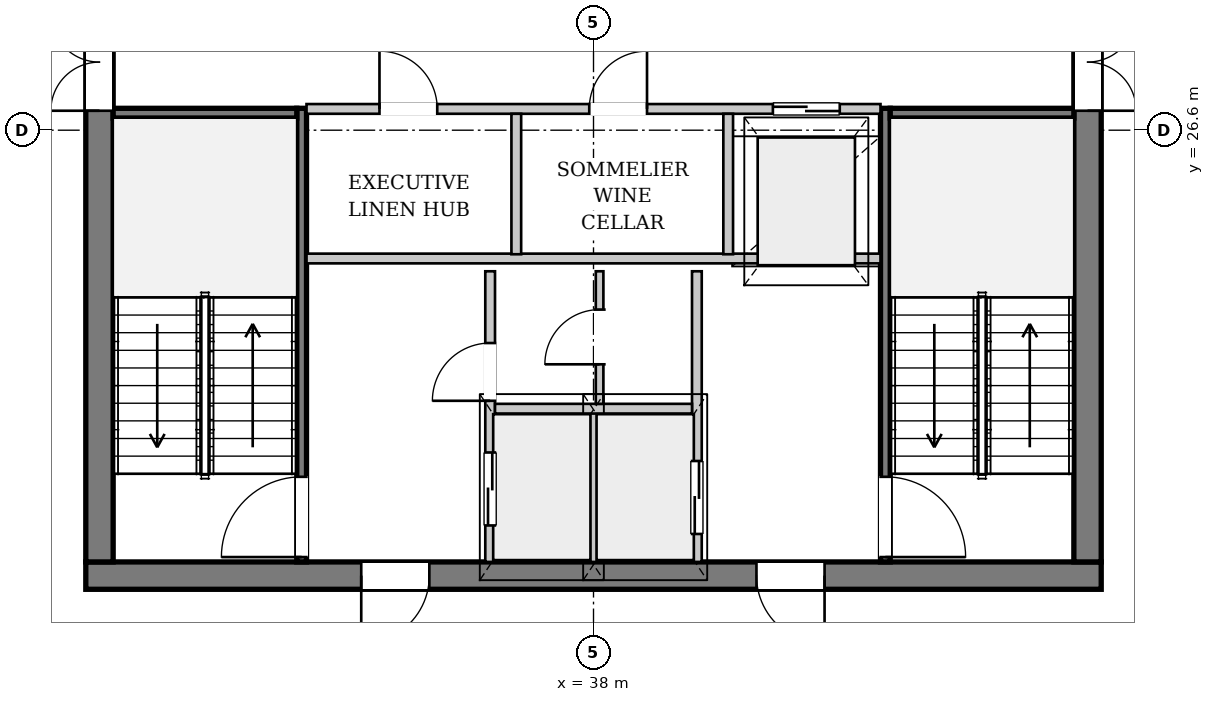
"""IFC4 building model, lengths in metres.
Left out: names, types, materials, properties, quantities, classifications, styles, units other than length and angle.
Written with IfcOpenShell. Run it as: python <this file> out.ifc"""

import sys

from ifc_helpers import new_model, si_unit, direction, frame, frame_2d, origin, place, context, subcontext, project, spatial, rectangle, extrude, source, transform, mapped, element, fill, save


model = new_model("IFC4")
c1 = context("Model", 3, precision=1e-05, world=origin(), true_north=direction((0.0, 1.0)))
c2 = subcontext(c1, "Body", "Model", "MODEL_VIEW")
j1 = project(units=[si_unit("LENGTHUNIT", "METRE"), si_unit("PLANEANGLEUNIT", "RADIAN")], contexts=[c1])
p1 = place(None, origin())
s1 = spatial("IfcSite", under=j1, at=p1, CompositionType="ELEMENT")
p2 = place(p1, origin())
s2 = spatial("IfcBuilding", under=s1, at=p2, CompositionType="ELEMENT")
p3 = place(p2, frame((0.0, 0.0, 259.7)))
s3 = spatial("IfcBuildingStorey", under=s2, at=p3, CompositionType="ELEMENT", Elevation=259.7)
p4 = place(p3, frame((51.72, 26.618, 0.0), z_axis=(0.0, 0.0, 1.0), x_axis=(-0.270053350252, -0.962845360386, 0.0)))
e1 = element("IfcWall", 1, at=p4, inside=s3, PredefinedType="SOLIDWALL", context=c2, shape_type="SweptSolid", body=[
    extrude(rectangle(XDim=22.391, YDim=0.32, at=frame_2d((11.195, 0.0))), origin(), (0.0, 0.0, 1.0), 2.872),
])
p5 = place(p4, frame((6.415, 0.0, 0.0)))
e2 = element("IfcOpeningElement", 2, at=p5, cuts=e1, PredefinedType="OPENING", context=c2, shape_type="SweptSolid", body=[
    extrude(rectangle(XDim=1.5, YDim=2.3, at=frame_2d((0.75, 1.15))), frame((0.0, 0.17, 0.0), z_axis=(0.0, -1.0, 0.0), x_axis=(1.0, 0.0, 0.0)), (0.0, 0.0, 1.0), 0.34),
])
p6 = place(p4, frame((15.269, 0.0, 0.402)))
e3 = element("IfcOpeningElement", 3, at=p6, cuts=e1, PredefinedType="OPENING", context=c2, shape_type="SweptSolid", body=[
    extrude(rectangle(XDim=2.6, YDim=2.35, at=frame_2d((1.3, 1.175))), frame((0.0, 0.17, 0.0), z_axis=(0.0, -1.0, 0.0), x_axis=(1.0, 0.0, 0.0)), (0.0, 0.0, 1.0), 0.34),
])
p7 = place(p3, frame((15.819, 27.087, 0.0), z_axis=(0.0, 0.0, 1.0), x_axis=(0.810286001924, 0.586034636421, 0.0)))
e4 = element("IfcWall", 4, at=p7, inside=s3, PredefinedType="SOLIDWALL", context=c2, shape_type="SweptSolid", body=[
    extrude(rectangle(XDim=21.866, YDim=0.38, at=frame_2d((10.933, 0.0))), origin(), (0.0, 0.0, 1.0), 2.872),
])
p8 = place(p7, frame((5.023, 0.0, 0.502)))
e5 = element("IfcOpeningElement", 5, at=p8, cuts=e4, PredefinedType="OPENING", context=c2, shape_type="SweptSolid", body=[
    extrude(rectangle(XDim=2.2, YDim=2.25, at=frame_2d((1.1, 1.125))), frame((0.0, 0.2, 0.0), z_axis=(0.0, -1.0, 0.0), x_axis=(1.0, 0.0, 0.0)), (0.0, 0.0, 1.0), 0.4),
])
p9 = place(p7, frame((16.244, 0.0, 0.502)))
e6 = element("IfcOpeningElement", 6, at=p9, cuts=e4, PredefinedType="OPENING", context=c2, shape_type="SweptSolid", body=[
    extrude(rectangle(XDim=2.2, YDim=2.25, at=frame_2d((1.1, 1.125))), frame((0.0, 0.2, 0.0), z_axis=(0.0, -1.0, 0.0), x_axis=(1.0, 0.0, 0.0)), (0.0, 0.0, 1.0), 0.4),
])
p10 = place(p3, frame((46.35, 19.275, 0.0), z_axis=(0.0, 0.0, 1.0), x_axis=(-1.0, 0.0, 0.0)))
e7 = element("IfcWall", 7, at=p10, inside=s3, PredefinedType="SHEAR", context=c2, shape_type="SweptSolid", body=[
    extrude(rectangle(XDim=16.7, YDim=0.45, at=frame_2d((8.35, 0.0))), origin(), (0.0, 0.0, 1.0), 3.38),
])
p11 = place(p10, frame((4.55, 0.0, 0.0)))
e8 = element("IfcOpeningElement", 8, at=p11, cuts=e7, PredefinedType="OPENING", context=c2, shape_type="SweptSolid", body=[
    extrude(rectangle(XDim=1.12, YDim=2.25, at=frame_2d((0.56, 1.125))), frame((0.0, 0.235, 0.0), z_axis=(0.0, -1.0, 0.0), x_axis=(1.0, 0.0, 0.0)), (0.0, 0.0, 1.0), 0.47),
])
p12 = place(p10, frame((11.05, 0.0, 0.0)))
e9 = element("IfcOpeningElement", 9, at=p12, cuts=e7, PredefinedType="OPENING", context=c2, shape_type="SweptSolid", body=[
    extrude(rectangle(XDim=1.12, YDim=2.25, at=frame_2d((0.56, 1.125))), frame((0.0, 0.235, 0.0), z_axis=(0.0, -1.0, 0.0), x_axis=(1.0, 0.0, 0.0)), (0.0, 0.0, 1.0), 0.47),
])
p13 = place(p3, frame((29.875, 19.5, 0.0), z_axis=(0.0, 0.0, 1.0), x_axis=(0.0, 1.0, 0.0)))
e10 = element("IfcWall", 10, at=p13, inside=s3, PredefinedType="SHEAR", context=c2, shape_type="SweptSolid", body=[
    extrude(rectangle(XDim=14.2, YDim=0.45, at=frame_2d((7.1, 0.0))), origin(), (0.0, 0.0, 1.0), 3.38),
])
p14 = place(p13, frame((7.42, 0.0, 0.0)))
e11 = element("IfcOpeningElement", 11, at=p14, cuts=e10, PredefinedType="OPENING", context=c2, shape_type="SweptSolid", body=[
    extrude(rectangle(XDim=1.6, YDim=2.2, at=frame_2d((0.8, 1.1))), frame((0.0, 0.235, 0.0), z_axis=(0.0, -1.0, 0.0), x_axis=(1.0, 0.0, 0.0)), (0.0, 0.0, 1.0), 0.47),
])
p15 = place(p3, frame((46.125, 33.7, 0.0), z_axis=(0.0, 0.0, 1.0), x_axis=(0.0, -1.0, 0.0)))
e12 = element("IfcWall", 12, at=p15, inside=s3, PredefinedType="SHEAR", context=c2, shape_type="SweptSolid", body=[
    extrude(rectangle(XDim=14.2, YDim=0.45, at=frame_2d((7.1, 0.0))), origin(), (0.0, 0.0, 1.0), 3.38),
])
p16 = place(p15, frame((5.18, 0.0, 0.0)))
e13 = element("IfcOpeningElement", 13, at=p16, cuts=e12, PredefinedType="OPENING", context=c2, shape_type="SweptSolid", body=[
    extrude(rectangle(XDim=1.6, YDim=2.2, at=frame_2d((0.8, 1.1))), frame((0.0, 0.235, 0.0), z_axis=(0.0, -1.0, 0.0), x_axis=(1.0, 0.0, 0.0)), (0.0, 0.0, 1.0), 0.47),
])
p17 = place(p15, frame((2.05, 0.0, 0.0)))
e14 = element("IfcOpeningElement", 14, at=p17, cuts=e12, PredefinedType="OPENING", context=c2, shape_type="SweptSolid", body=[
    extrude(rectangle(XDim=0.95, YDim=2.1, at=frame_2d((0.475, 1.05))), frame((0.0, 0.235, 0.0), z_axis=(0.0, -1.0, 0.0), x_axis=(1.0, 0.0, 0.0)), (0.0, 0.0, 1.0), 0.47),
])
p18 = place(p3, frame((33.2, 19.5, 0.0), z_axis=(0.0, 0.0, 1.0), x_axis=(0.0, 1.0, 0.0)))
e15 = element("IfcWall", 15, at=p18, inside=s3, PredefinedType="PARTITIONING", context=c2, shape_type="SweptSolid", body=[
    extrude(rectangle(XDim=7.46, YDim=0.16, at=frame_2d((3.73, 0.0))), origin(), (0.0, 0.0, 1.0), 3.38),
])
p19 = place(p18, frame((0.08, 0.0, 0.0)))
e16 = element("IfcOpeningElement", 16, at=p19, cuts=e15, PredefinedType="OPENING", context=c2, shape_type="SweptSolid", body=[
    extrude(rectangle(XDim=1.32, YDim=2.2, at=frame_2d((0.66, 1.1))), frame((0.0, 0.09, 0.0), z_axis=(0.0, -1.0, 0.0), x_axis=(1.0, 0.0, 0.0)), (0.0, 0.0, 1.0), 0.18),
])
p20 = place(p3, frame((30.1, 26.88, 0.0), z_axis=(0.0, 0.0, 1.0), x_axis=(1.0, 0.0, 0.0)))
e17 = element("IfcWall", 17, at=p20, inside=s3, PredefinedType="PARTITIONING", context=c2, shape_type="SweptSolid", body=[
    extrude(rectangle(XDim=3.02, YDim=0.16, at=frame_2d((1.51, 0.0))), origin(), (0.0, 0.0, 1.0), 3.38),
])
p21 = place(p3, frame((42.8, 26.96, 0.0), z_axis=(0.0, 0.0, 1.0), x_axis=(0.0, -1.0, 0.0)))
e18 = element("IfcWall", 18, at=p21, inside=s3, PredefinedType="PARTITIONING", context=c2, shape_type="SweptSolid", body=[
    extrude(rectangle(XDim=7.46, YDim=0.16, at=frame_2d((3.73, 0.0))), origin(), (0.0, 0.0, 1.0), 3.38),
])
p22 = place(p21, frame((6.06, 0.0, 0.0)))
e19 = element("IfcOpeningElement", 19, at=p22, cuts=e18, PredefinedType="OPENING", context=c2, shape_type="SweptSolid", body=[
    extrude(rectangle(XDim=1.32, YDim=2.2, at=frame_2d((0.66, 1.1))), frame((0.0, 0.09, 0.0), z_axis=(0.0, -1.0, 0.0), x_axis=(1.0, 0.0, 0.0)), (0.0, 0.0, 1.0), 0.18),
])
p23 = place(p3, frame((42.88, 26.88, 0.0), z_axis=(0.0, 0.0, 1.0), x_axis=(1.0, 0.0, 0.0)))
e20 = element("IfcWall", 20, at=p23, inside=s3, PredefinedType="PARTITIONING", context=c2, shape_type="SweptSolid", body=[
    extrude(rectangle(XDim=3.02, YDim=0.16, at=frame_2d((1.51, 0.0))), origin(), (0.0, 0.0, 1.0), 3.38),
])
p24 = place(p3, frame((36.3, 19.5, 0.0), z_axis=(0.0, 0.0, 1.0), x_axis=(0.0, 1.0, 0.0)))
e21 = element("IfcWall", 21, at=p24, inside=s3, PredefinedType="PARTITIONING", context=c2, shape_type="SweptSolid", body=[
    extrude(rectangle(XDim=4.78, YDim=0.16, at=frame_2d((2.39, 0.0))), origin(), (0.0, 0.0, 1.0), 3.38),
])
p25 = place(p24, frame((0.6, 0.0, 0.0)))
e22 = element("IfcOpeningElement", 22, at=p25, cuts=e21, PredefinedType="OPENING", context=c2, shape_type="SweptSolid", body=[
    extrude(rectangle(XDim=1.2, YDim=2.2, at=frame_2d((0.6, 1.1))), frame((0.0, 0.09, 0.0), z_axis=(0.0, -1.0, 0.0), x_axis=(1.0, 0.0, 0.0)), (0.0, 0.0, 1.0), 0.18),
])
p26 = place(p24, frame((2.65, 0.0, 0.0)))
e23 = element("IfcOpeningElement", 23, at=p26, cuts=e21, PredefinedType="OPENING", context=c2, shape_type="SweptSolid", body=[
    extrude(rectangle(XDim=0.95, YDim=2.1, at=frame_2d((0.475, 1.05))), frame((0.0, 0.09, 0.0), z_axis=(0.0, -1.0, 0.0), x_axis=(1.0, 0.0, 0.0)), (0.0, 0.0, 1.0), 0.18),
])
p27 = place(p3, frame((39.7, 24.28, 0.0), z_axis=(0.0, 0.0, 1.0), x_axis=(0.0, -1.0, 0.0)))
e24 = element("IfcWall", 24, at=p27, inside=s3, PredefinedType="PARTITIONING", context=c2, shape_type="SweptSolid", body=[
    extrude(rectangle(XDim=4.78, YDim=0.16, at=frame_2d((2.39, 0.0))), origin(), (0.0, 0.0, 1.0), 3.38),
])
p28 = place(p27, frame((3.12, 0.0, 0.0)))
e25 = element("IfcOpeningElement", 25, at=p28, cuts=e24, PredefinedType="OPENING", context=c2, shape_type="SweptSolid", body=[
    extrude(rectangle(XDim=1.2, YDim=2.2, at=frame_2d((0.6, 1.1))), frame((0.0, 0.09, 0.0), z_axis=(0.0, -1.0, 0.0), x_axis=(1.0, 0.0, 0.0)), (0.0, 0.0, 1.0), 0.18),
])
p29 = place(p3, frame((38.0, 19.5, 0.0), z_axis=(0.0, 0.0, 1.0), x_axis=(0.0, 1.0, 0.0)))
e26 = element("IfcWall", 26, at=p29, inside=s3, PredefinedType="PARTITIONING", context=c2, shape_type="SweptSolid", body=[
    extrude(rectangle(XDim=2.46, YDim=0.125, at=frame_2d((1.23, 0.0))), origin(), (0.0, 0.0, 1.0), 3.38),
])
p30 = place(p3, frame((36.38, 22.02, 0.0), z_axis=(0.0, 0.0, 1.0), x_axis=(1.0, 0.0, 0.0)))
e27 = element("IfcWall", 27, at=p30, inside=s3, PredefinedType="PARTITIONING", context=c2, shape_type="SweptSolid", body=[
    extrude(rectangle(XDim=3.24, YDim=0.16, at=frame_2d((1.62, 0.0))), origin(), (0.0, 0.0, 1.0), 3.38),
])
p31 = place(p3, frame((33.28, 24.49, 0.0), z_axis=(0.0, 0.0, 1.0), x_axis=(1.0, 0.0, 0.0)))
e28 = element("IfcWall", 28, at=p31, inside=s3, PredefinedType="PARTITIONING", context=c2, shape_type="SweptSolid", body=[
    extrude(rectangle(XDim=9.44, YDim=0.16, at=frame_2d((4.72, 0.0))), origin(), (0.0, 0.0, 1.0), 3.38),
])
p32 = place(p3, frame((38.1, 22.1, 0.0), z_axis=(0.0, 0.0, 1.0), x_axis=(0.0, 1.0, 0.0)))
e29 = element("IfcWall", 29, at=p32, inside=s3, PredefinedType="PARTITIONING", context=c2, shape_type="SweptSolid", body=[
    extrude(rectangle(XDim=2.18, YDim=0.125, at=frame_2d((1.09, 0.0))), origin(), (0.0, 0.0, 1.0), 3.38),
])
p33 = place(p32, frame((0.65, 0.0, 0.0)))
e30 = element("IfcOpeningElement", 30, at=p33, cuts=e29, PredefinedType="OPENING", context=c2, shape_type="SweptSolid", body=[
    extrude(rectangle(XDim=0.9, YDim=2.1, at=frame_2d((0.45, 1.05))), frame((0.0, 0.073, 0.0), z_axis=(0.0, -1.0, 0.0), x_axis=(1.0, 0.0, 0.0)), (0.0, 0.0, 1.0), 0.145),
])
p34 = place(p3, frame((33.28, 26.95, 0.0), z_axis=(0.0, 0.0, 1.0), x_axis=(1.0, 0.0, 0.0)))
e31 = element("IfcWall", 31, at=p34, inside=s3, PredefinedType="PARTITIONING", context=c2, shape_type="SweptSolid", body=[
    extrude(rectangle(XDim=9.44, YDim=0.16, at=frame_2d((4.72, 0.0))), origin(), (0.0, 0.0, 1.0), 3.38),
])
p35 = place(p34, frame((1.2, 0.0, 0.0)))
e32 = element("IfcOpeningElement", 32, at=p35, cuts=e31, PredefinedType="OPENING", context=c2, shape_type="SweptSolid", body=[
    extrude(rectangle(XDim=0.95, YDim=2.1, at=frame_2d((0.475, 1.05))), frame((0.0, 0.09, 0.0), z_axis=(0.0, -1.0, 0.0), x_axis=(1.0, 0.0, 0.0)), (0.0, 0.0, 1.0), 0.18),
])
p36 = place(p34, frame((4.65, 0.0, 0.0)))
e33 = element("IfcOpeningElement", 33, at=p36, cuts=e31, PredefinedType="OPENING", context=c2, shape_type="SweptSolid", body=[
    extrude(rectangle(XDim=0.95, YDim=2.1, at=frame_2d((0.475, 1.05))), frame((0.0, 0.09, 0.0), z_axis=(0.0, -1.0, 0.0), x_axis=(1.0, 0.0, 0.0)), (0.0, 0.0, 1.0), 0.18),
])
p37 = place(p34, frame((7.67, 0.0, 0.0)))
e34 = element("IfcOpeningElement", 34, at=p37, cuts=e31, PredefinedType="OPENING", context=c2, shape_type="SweptSolid", body=[
    extrude(rectangle(XDim=1.1, YDim=2.2, at=frame_2d((0.55, 1.1))), frame((0.0, 0.09, 0.0), z_axis=(0.0, -1.0, 0.0), x_axis=(1.0, 0.0, 0.0)), (0.0, 0.0, 1.0), 0.18),
])
for number, where, z_axis, x_axis in (
    (35, (36.73, 24.56, 0.0), (0.0, 0.0, 1.0), (0.0, 1.0, 0.0)),
    (36, (40.215, 24.56, 0.0), (0.0, 0.0, 1.0), (0.0, 1.0, 0.0)),
):
    element("IfcWall", number, at=place(p3, frame(where, z_axis=z_axis, x_axis=x_axis)), inside=s3, PredefinedType="PARTITIONING", context=c2, shape_type="SweptSolid", body=[
        extrude(rectangle(XDim=2.31, YDim=0.16, at=frame_2d((1.155, 0.0))), origin(), (0.0, 0.0, 1.0), 3.38),
    ])
m1 = source(origin(), c2, "Body", "SweptSolid", [
    extrude(rectangle(XDim=1.12, YDim=2.25, at=frame_2d((0.56, 1.125))), frame((0.0, 0.025, 0.0), z_axis=(0.0, -1.0, 0.0), x_axis=(1.0, 0.0, 0.0)), (0.0, 0.0, 1.0), 0.05),
])
p38 = place(p11, origin())
e37 = element("IfcDoor", 37, at=p38, inside=s3, OperationType="SINGLE_SWING_LEFT", PredefinedType="DOOR", context=c2, shape_type="MappedRepresentation", body=[
    mapped(m1, transform((0.0, 0.0, 0.0), x_axis=(1.0, 0.0, 0.0), y_axis=(0.0, 1.0, 0.0), z_axis=(0.0, 0.0, 1.0), scale=1.0)),
])
fill(e8, e37)
p39 = place(p12, origin())
e38 = element("IfcDoor", 38, at=p39, inside=s3, OperationType="SINGLE_SWING_RIGHT", PredefinedType="DOOR", context=c2, shape_type="MappedRepresentation", body=[
    mapped(m1, transform((0.0, 0.0, 0.0), x_axis=(1.0, 0.0, 0.0), y_axis=(0.0, 1.0, 0.0), z_axis=(0.0, 0.0, 1.0), scale=1.0)),
])
fill(e9, e38)
m2 = source(origin(), c2, "Body", "SweptSolid", [
    extrude(rectangle(XDim=1.6, YDim=2.2, at=frame_2d((0.8, 1.1))), frame((0.0, 0.025, 0.0), z_axis=(0.0, -1.0, 0.0), x_axis=(1.0, 0.0, 0.0)), (0.0, 0.0, 1.0), 0.05),
])
p40 = place(p14, origin())
e39 = element("IfcDoor", 39, at=p40, inside=s3, OperationType="DOUBLE_DOOR_SINGLE_SWING", PredefinedType="DOOR", context=c2, shape_type="MappedRepresentation", body=[
    mapped(m2, transform((0.0, 0.0, 0.0), x_axis=(1.0, 0.0, 0.0), y_axis=(0.0, 1.0, 0.0), z_axis=(0.0, 0.0, 1.0), scale=1.0)),
])
fill(e11, e39)
p41 = place(p16, origin())
e40 = element("IfcDoor", 40, at=p41, inside=s3, OperationType="DOUBLE_DOOR_SINGLE_SWING", PredefinedType="DOOR", context=c2, shape_type="MappedRepresentation", body=[
    mapped(m2, transform((0.0, 0.0, 0.0), x_axis=(1.0, 0.0, 0.0), y_axis=(0.0, 1.0, 0.0), z_axis=(0.0, 0.0, 1.0), scale=1.0)),
])
fill(e13, e40)
m3 = source(origin(), c2, "Body", "SweptSolid", [
    extrude(rectangle(XDim=1.32, YDim=2.2, at=frame_2d((0.66, 1.1))), frame((0.0, 0.025, 0.0), z_axis=(0.0, -1.0, 0.0), x_axis=(1.0, 0.0, 0.0)), (0.0, 0.0, 1.0), 0.05),
])
p42 = place(p19, origin())
e41 = element("IfcDoor", 41, at=p42, inside=s3, OperationType="SINGLE_SWING_LEFT", PredefinedType="DOOR", context=c2, shape_type="MappedRepresentation", body=[
    mapped(m3, transform((0.0, 0.0, 0.0), x_axis=(1.0, 0.0, 0.0), y_axis=(0.0, 1.0, 0.0), z_axis=(0.0, 0.0, 1.0), scale=1.0)),
])
fill(e16, e41)
p43 = place(p22, origin())
e42 = element("IfcDoor", 42, at=p43, inside=s3, OperationType="SINGLE_SWING_RIGHT", PredefinedType="DOOR", context=c2, shape_type="MappedRepresentation", body=[
    mapped(m3, transform((0.0, 0.0, 0.0), x_axis=(1.0, 0.0, 0.0), y_axis=(0.0, 1.0, 0.0), z_axis=(0.0, 0.0, 1.0), scale=1.0)),
])
fill(e19, e42)
m4 = source(origin(), c2, "Body", "SweptSolid", [
    extrude(rectangle(XDim=1.2, YDim=2.2, at=frame_2d((0.6, 1.1))), frame((0.0, 0.025, 0.0), z_axis=(0.0, -1.0, 0.0), x_axis=(1.0, 0.0, 0.0)), (0.0, 0.0, 1.0), 0.05),
])
p44 = place(p25, origin())
e43 = element("IfcDoor", 43, at=p44, inside=s3, OperationType="DOUBLE_DOOR_SLIDING", PredefinedType="DOOR", context=c2, shape_type="MappedRepresentation", body=[
    mapped(m4, transform((0.0, 0.0, 0.0), x_axis=(1.0, 0.0, 0.0), y_axis=(0.0, 1.0, 0.0), z_axis=(0.0, 0.0, 1.0), scale=1.0)),
])
fill(e22, e43)
m5 = source(origin(), c2, "Body", "SweptSolid", [
    extrude(rectangle(XDim=0.95, YDim=2.1, at=frame_2d((0.475, 1.05))), frame((0.0, 0.025, 0.0), z_axis=(0.0, -1.0, 0.0), x_axis=(1.0, 0.0, 0.0)), (0.0, 0.0, 1.0), 0.05),
])
p45 = place(p26, origin())
e44 = element("IfcDoor", 44, at=p45, inside=s3, OperationType="SINGLE_SWING_LEFT", PredefinedType="DOOR", context=c2, shape_type="MappedRepresentation", body=[
    mapped(m5, transform((0.0, 0.0, 0.0), x_axis=(1.0, 0.0, 0.0), y_axis=(0.0, 1.0, 0.0), z_axis=(0.0, 0.0, 1.0), scale=1.0)),
])
fill(e23, e44)
m6 = source(origin(), c2, "Body", "SweptSolid", [
    extrude(rectangle(XDim=0.9, YDim=2.1, at=frame_2d((0.45, 1.05))), frame((0.0, 0.025, 0.0), z_axis=(0.0, -1.0, 0.0), x_axis=(1.0, 0.0, 0.0)), (0.0, 0.0, 1.0), 0.05),
])
p46 = place(p33, origin())
e45 = element("IfcDoor", 45, at=p46, inside=s3, OperationType="SINGLE_SWING_LEFT", PredefinedType="DOOR", context=c2, shape_type="MappedRepresentation", body=[
    mapped(m6, transform((0.0, 0.0, 0.0), x_axis=(1.0, 0.0, 0.0), y_axis=(0.0, 1.0, 0.0), z_axis=(0.0, 0.0, 1.0), scale=1.0)),
])
fill(e30, e45)
p47 = place(p28, origin())
e46 = element("IfcDoor", 46, at=p47, inside=s3, OperationType="DOUBLE_DOOR_SLIDING", PredefinedType="DOOR", context=c2, shape_type="MappedRepresentation", body=[
    mapped(m4, transform((0.0, 0.0, 0.0), x_axis=(1.0, 0.0, 0.0), y_axis=(0.0, 1.0, 0.0), z_axis=(0.0, 0.0, 1.0), scale=1.0)),
])
fill(e25, e46)
p48 = place(p35, origin())
e47 = element("IfcDoor", 47, at=p48, inside=s3, OperationType="SINGLE_SWING_LEFT", PredefinedType="DOOR", context=c2, shape_type="MappedRepresentation", body=[
    mapped(m5, transform((0.0, 0.0, 0.0), x_axis=(1.0, 0.0, 0.0), y_axis=(0.0, 1.0, 0.0), z_axis=(0.0, 0.0, 1.0), scale=1.0)),
])
fill(e32, e47)
p49 = place(p36, origin())
e48 = element("IfcDoor", 48, at=p49, inside=s3, OperationType="SINGLE_SWING_RIGHT", PredefinedType="DOOR", context=c2, shape_type="MappedRepresentation", body=[
    mapped(m5, transform((0.0, 0.0, 0.0), x_axis=(1.0, 0.0, 0.0), y_axis=(0.0, 1.0, 0.0), z_axis=(0.0, 0.0, 1.0), scale=1.0)),
])
fill(e33, e48)
m7 = source(origin(), c2, "Body", "SweptSolid", [
    extrude(rectangle(XDim=1.1, YDim=2.2, at=frame_2d((0.55, 1.1))), frame((0.0, 0.025, 0.0), z_axis=(0.0, -1.0, 0.0), x_axis=(1.0, 0.0, 0.0)), (0.0, 0.0, 1.0), 0.05),
])
p50 = place(p37, origin())
e49 = element("IfcDoor", 49, at=p50, inside=s3, OperationType="DOUBLE_DOOR_SLIDING", PredefinedType="DOOR", context=c2, shape_type="MappedRepresentation", body=[
    mapped(m7, transform((0.0, 0.0, 0.0), x_axis=(1.0, 0.0, 0.0), y_axis=(0.0, 1.0, 0.0), z_axis=(0.0, 0.0, 1.0), scale=1.0)),
])
fill(e34, e49)
save(model, sys.argv[1])
